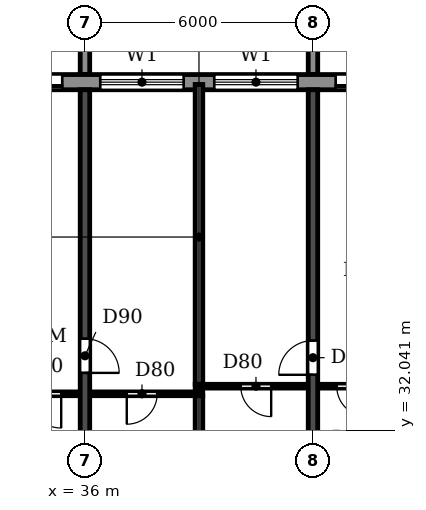
"""IFC4 building model, lengths in metres.
Left out: names, types, materials, properties, quantities, classifications, styles, units other than length and angle.
Written with IfcOpenShell. Run it as: python <this file> out.ifc"""

import sys

from ifc_helpers import new_model, si_unit, direction, frame, frame_2d, origin, place, context, subcontext, project, spatial, polyline, rectangle, outline, extrude, source, transform, mapped, element, fill, save


model = new_model("IFC4")
c1 = context("Model", 3, precision=1e-05, world=origin(), true_north=direction((0.0, 1.0)))
c2 = subcontext(c1, "Body", "Model", "MODEL_VIEW")
j1 = project(units=[si_unit("LENGTHUNIT", "METRE"), si_unit("PLANEANGLEUNIT", "RADIAN")], contexts=[c1])
p1 = place(None, origin())
s1 = spatial("IfcSite", under=j1, at=p1, CompositionType="ELEMENT")
p2 = place(p1, origin())
s2 = spatial("IfcBuilding", under=s1, at=p2, CompositionType="ELEMENT")
p3 = place(p2, frame((0.0, 0.0, 181.8)))
s3 = spatial("IfcBuildingStorey", under=s2, at=p3, CompositionType="ELEMENT", Elevation=181.8)
p4 = place(p3, frame((36.0, 30.5, 0.0), z_axis=(0.0, 0.0, 1.0), x_axis=(0.0, 1.0, 0.0)))
e1 = element("IfcWall", 1, at=p4, inside=s3, PredefinedType="SHEAR", context=c2, shape_type="SweptSolid", body=[
    extrude(rectangle(XDim=10.5, YDim=0.25, at=frame_2d((5.25, 0.0))), origin(), (0.0, 0.0, 1.0), 3.08),
])
p5 = place(p4, frame((3.05, 0.0, 0.0)))
e2 = element("IfcOpeningElement", 2, at=p5, cuts=e1, PredefinedType="OPENING", context=c2, shape_type="SweptSolid", body=[
    extrude(rectangle(XDim=0.9, YDim=2.1, at=frame_2d((0.45, 1.05))), frame((0.0, 0.135, 0.0), z_axis=(0.0, -1.0, 0.0), x_axis=(1.0, 0.0, 0.0)), (0.0, 0.0, 1.0), 0.27),
])
p6 = place(p3, frame((42.0, 30.5, 0.0), z_axis=(0.0, 0.0, 1.0), x_axis=(0.0, 1.0, 0.0)))
e3 = element("IfcWall", 3, at=p6, inside=s3, PredefinedType="SHEAR", context=c2, shape_type="SweptSolid", body=[
    extrude(rectangle(XDim=10.5, YDim=0.25, at=frame_2d((5.25, 0.0))), origin(), (0.0, 0.0, 1.0), 3.08),
])
p7 = place(p6, frame((3.0, 0.0, 0.0)))
e4 = element("IfcOpeningElement", 4, at=p7, cuts=e3, PredefinedType="OPENING", context=c2, shape_type="SweptSolid", body=[
    extrude(rectangle(XDim=0.9, YDim=2.1, at=frame_2d((0.45, 1.05))), frame((0.0, 0.135, 0.0), z_axis=(0.0, -1.0, 0.0), x_axis=(1.0, 0.0, 0.0)), (0.0, 0.0, 1.0), 0.27),
])
p8 = place(p3, frame((79.317, 41.2, 0.0), z_axis=(0.0, 0.0, 1.0), x_axis=(-1.0, 0.0, 0.0)))
e5 = element("IfcWall", 5, at=p8, inside=s3, PredefinedType="STANDARD", context=c2, shape_type="SweptSolid", body=[
    extrude(rectangle(XDim=56.634, YDim=0.4, at=frame_2d((28.317, 0.0))), origin(), (0.0, 0.0, 1.0), 3.08),
])
p9 = place(p8, frame((52.917, 0.0, 0.0)))
e6 = element("IfcOpeningElement", 6, at=p9, cuts=e5, PredefinedType="OPENING", context=c2, shape_type="SweptSolid", body=[
    extrude(rectangle(XDim=1.8, YDim=2.4, at=frame_2d((0.9, 1.2))), frame((0.0, 0.21, 0.0), z_axis=(0.0, -1.0, 0.0), x_axis=(1.0, 0.0, 0.0)), (0.0, 0.0, 1.0), 0.42),
])
p10 = place(p8, frame((49.717, 0.0, 0.9)))
e7 = element("IfcOpeningElement", 7, at=p10, cuts=e5, PredefinedType="OPENING", context=c2, shape_type="SweptSolid", body=[
    extrude(rectangle(XDim=2.2, YDim=1.5, at=frame_2d((1.1, 0.75))), frame((0.0, 0.21, 0.0), z_axis=(0.0, -1.0, 0.0), x_axis=(1.0, 0.0, 0.0)), (0.0, 0.0, 1.0), 0.42),
])
p11 = place(p8, frame((46.717, 0.0, 0.9)))
e8 = element("IfcOpeningElement", 8, at=p11, cuts=e5, PredefinedType="OPENING", context=c2, shape_type="SweptSolid", body=[
    extrude(rectangle(XDim=2.2, YDim=1.5, at=frame_2d((1.1, 0.75))), frame((0.0, 0.21, 0.0), z_axis=(0.0, -1.0, 0.0), x_axis=(1.0, 0.0, 0.0)), (0.0, 0.0, 1.0), 0.42),
])
p12 = place(p8, frame((43.917, 0.0, 0.0)))
e9 = element("IfcOpeningElement", 9, at=p12, cuts=e5, PredefinedType="OPENING", context=c2, shape_type="SweptSolid", body=[
    extrude(rectangle(XDim=1.8, YDim=2.4, at=frame_2d((0.9, 1.2))), frame((0.0, 0.21, 0.0), z_axis=(0.0, -1.0, 0.0), x_axis=(1.0, 0.0, 0.0)), (0.0, 0.0, 1.0), 0.42),
])
p13 = place(p8, frame((40.717, 0.0, 0.9)))
e10 = element("IfcOpeningElement", 10, at=p13, cuts=e5, PredefinedType="OPENING", context=c2, shape_type="SweptSolid", body=[
    extrude(rectangle(XDim=2.2, YDim=1.5, at=frame_2d((1.1, 0.75))), frame((0.0, 0.21, 0.0), z_axis=(0.0, -1.0, 0.0), x_axis=(1.0, 0.0, 0.0)), (0.0, 0.0, 1.0), 0.42),
])
p14 = place(p8, frame((37.717, 0.0, 0.9)))
e11 = element("IfcOpeningElement", 11, at=p14, cuts=e5, PredefinedType="OPENING", context=c2, shape_type="SweptSolid", body=[
    extrude(rectangle(XDim=2.2, YDim=1.5, at=frame_2d((1.1, 0.75))), frame((0.0, 0.21, 0.0), z_axis=(0.0, -1.0, 0.0), x_axis=(1.0, 0.0, 0.0)), (0.0, 0.0, 1.0), 0.42),
])
p15 = place(p8, frame((34.917, 0.0, 0.0)))
e12 = element("IfcOpeningElement", 12, at=p15, cuts=e5, PredefinedType="OPENING", context=c2, shape_type="SweptSolid", body=[
    extrude(rectangle(XDim=1.8, YDim=2.4, at=frame_2d((0.9, 1.2))), frame((0.0, 0.21, 0.0), z_axis=(0.0, -1.0, 0.0), x_axis=(1.0, 0.0, 0.0)), (0.0, 0.0, 1.0), 0.42),
])
p16 = place(p8, frame((31.717, 0.0, 0.9)))
e13 = element("IfcOpeningElement", 13, at=p16, cuts=e5, PredefinedType="OPENING", context=c2, shape_type="SweptSolid", body=[
    extrude(rectangle(XDim=2.2, YDim=1.5, at=frame_2d((1.1, 0.75))), frame((0.0, 0.21, 0.0), z_axis=(0.0, -1.0, 0.0), x_axis=(1.0, 0.0, 0.0)), (0.0, 0.0, 1.0), 0.42),
])
p17 = place(p8, frame((28.717, 0.0, 0.9)))
e14 = element("IfcOpeningElement", 14, at=p17, cuts=e5, PredefinedType="OPENING", context=c2, shape_type="SweptSolid", body=[
    extrude(rectangle(XDim=2.2, YDim=1.5, at=frame_2d((1.1, 0.75))), frame((0.0, 0.21, 0.0), z_axis=(0.0, -1.0, 0.0), x_axis=(1.0, 0.0, 0.0)), (0.0, 0.0, 1.0), 0.42),
])
p18 = place(p8, frame((25.717, 0.0, 0.9)))
e15 = element("IfcOpeningElement", 15, at=p18, cuts=e5, PredefinedType="OPENING", context=c2, shape_type="SweptSolid", body=[
    extrude(rectangle(XDim=2.2, YDim=1.5, at=frame_2d((1.1, 0.75))), frame((0.0, 0.21, 0.0), z_axis=(0.0, -1.0, 0.0), x_axis=(1.0, 0.0, 0.0)), (0.0, 0.0, 1.0), 0.42),
])
p19 = place(p8, frame((22.917, 0.0, 0.0)))
e16 = element("IfcOpeningElement", 16, at=p19, cuts=e5, PredefinedType="OPENING", context=c2, shape_type="SweptSolid", body=[
    extrude(rectangle(XDim=1.8, YDim=2.4, at=frame_2d((0.9, 1.2))), frame((0.0, 0.21, 0.0), z_axis=(0.0, -1.0, 0.0), x_axis=(1.0, 0.0, 0.0)), (0.0, 0.0, 1.0), 0.42),
])
p20 = place(p8, frame((19.717, 0.0, 0.9)))
e17 = element("IfcOpeningElement", 17, at=p20, cuts=e5, PredefinedType="OPENING", context=c2, shape_type="SweptSolid", body=[
    extrude(rectangle(XDim=2.2, YDim=1.5, at=frame_2d((1.1, 0.75))), frame((0.0, 0.21, 0.0), z_axis=(0.0, -1.0, 0.0), x_axis=(1.0, 0.0, 0.0)), (0.0, 0.0, 1.0), 0.42),
])
p21 = place(p8, frame((16.917, 0.0, 0.0)))
e18 = element("IfcOpeningElement", 18, at=p21, cuts=e5, PredefinedType="OPENING", context=c2, shape_type="SweptSolid", body=[
    extrude(rectangle(XDim=1.8, YDim=2.4, at=frame_2d((0.9, 1.2))), frame((0.0, 0.21, 0.0), z_axis=(0.0, -1.0, 0.0), x_axis=(1.0, 0.0, 0.0)), (0.0, 0.0, 1.0), 0.42),
])
p22 = place(p8, frame((13.717, 0.0, 0.9)))
e19 = element("IfcOpeningElement", 19, at=p22, cuts=e5, PredefinedType="OPENING", context=c2, shape_type="SweptSolid", body=[
    extrude(rectangle(XDim=2.2, YDim=1.5, at=frame_2d((1.1, 0.75))), frame((0.0, 0.21, 0.0), z_axis=(0.0, -1.0, 0.0), x_axis=(1.0, 0.0, 0.0)), (0.0, 0.0, 1.0), 0.42),
])
p23 = place(p8, frame((10.917, 0.0, 0.0)))
e20 = element("IfcOpeningElement", 20, at=p23, cuts=e5, PredefinedType="OPENING", context=c2, shape_type="SweptSolid", body=[
    extrude(rectangle(XDim=1.8, YDim=2.4, at=frame_2d((0.9, 1.2))), frame((0.0, 0.21, 0.0), z_axis=(0.0, -1.0, 0.0), x_axis=(1.0, 0.0, 0.0)), (0.0, 0.0, 1.0), 0.42),
])
p24 = place(p8, frame((7.717, 0.0, 0.9)))
e21 = element("IfcOpeningElement", 21, at=p24, cuts=e5, PredefinedType="OPENING", context=c2, shape_type="SweptSolid", body=[
    extrude(rectangle(XDim=2.2, YDim=1.5, at=frame_2d((1.1, 0.75))), frame((0.0, 0.21, 0.0), z_axis=(0.0, -1.0, 0.0), x_axis=(1.0, 0.0, 0.0)), (0.0, 0.0, 1.0), 0.42),
])
p25 = place(p8, frame((4.717, 0.0, 0.9)))
e22 = element("IfcOpeningElement", 22, at=p25, cuts=e5, PredefinedType="OPENING", context=c2, shape_type="SweptSolid", body=[
    extrude(rectangle(XDim=2.2, YDim=1.5, at=frame_2d((1.1, 0.75))), frame((0.0, 0.21, 0.0), z_axis=(0.0, -1.0, 0.0), x_axis=(1.0, 0.0, 0.0)), (0.0, 0.0, 1.0), 0.42),
])
p26 = place(p8, frame((1.917, 0.0, 0.0)))
e23 = element("IfcOpeningElement", 23, at=p26, cuts=e5, PredefinedType="OPENING", context=c2, shape_type="SweptSolid", body=[
    extrude(rectangle(XDim=1.8, YDim=2.4, at=frame_2d((0.9, 1.2))), frame((0.0, 0.21, 0.0), z_axis=(0.0, -1.0, 0.0), x_axis=(1.0, 0.0, 0.0)), (0.0, 0.0, 1.0), 0.42),
])
m1 = source(origin(), c2, "Body", "SweptSolid", [
    extrude(outline(polyline([(0.0, 0.0), (0.25, 0.0), (0.25, 3.1), (0.0, 3.1), (0.0, 0.0)])), origin(), (0.0, 0.0, 1.0), 3.1),
])
for number, where in (
    (24, (35.875, 41.4, 0.0)),
    (25, (41.875, 41.4, 0.0)),
):
    element("IfcWall", number, at=place(p3, frame(where)), inside=s3, PredefinedType="STANDARD", context=c2, shape_type="MappedRepresentation", body=[
        mapped(m1, transform((0.0, 0.0, 0.0))),
    ])
p27 = place(p3, frame((39.0, 30.51, 0.0), z_axis=(0.0, 0.0, 1.0), x_axis=(0.0, 1.0, 0.0)))
e26 = element("IfcWall", 26, at=p27, inside=s3, PredefinedType="PARTITIONING", context=c2, shape_type="SweptSolid", body=[
    extrude(rectangle(XDim=2.44, YDim=0.2, at=frame_2d((1.22, 0.0))), origin(), (0.0, 0.0, 1.0), 3.08),
])
p28 = place(p3, frame((39.0, 33.25, 0.0), z_axis=(0.0, 0.0, 1.0), x_axis=(0.0, 1.0, 0.0)))
e27 = element("IfcWall", 27, at=p28, inside=s3, PredefinedType="PARTITIONING", context=c2, shape_type="SweptSolid", body=[
    extrude(rectangle(XDim=7.89, YDim=0.2, at=frame_2d((3.945, 0.0))), origin(), (0.0, 0.0, 1.0), 3.08),
])
p29 = place(p3, frame((33.8, 33.0, 0.0), z_axis=(0.0, 0.0, 1.0), x_axis=(1.0, 0.0, 0.0)))
e28 = element("IfcWall", 28, at=p29, inside=s3, PredefinedType="PARTITIONING", context=c2, shape_type="SweptSolid", body=[
    extrude(rectangle(XDim=2.065, YDim=0.1, at=frame_2d((1.032, 0.0))), origin(), (0.0, 0.0, 1.0), 3.08),
])
p30 = place(p29, frame((0.675, 0.0, 0.0)))
e29 = element("IfcOpeningElement", 29, at=p30, cuts=e28, PredefinedType="OPENING", context=c2, shape_type="SweptSolid", body=[
    extrude(rectangle(XDim=0.9, YDim=2.1, at=frame_2d((0.45, 1.05))), frame((0.0, 0.06, 0.0), z_axis=(0.0, -1.0, 0.0), x_axis=(1.0, 0.0, 0.0)), (0.0, 0.0, 1.0), 0.12),
])
p31 = place(p3, frame((36.135, 33.0, 0.0), z_axis=(0.0, 0.0, 1.0), x_axis=(1.0, 0.0, 0.0)))
e30 = element("IfcWall", 30, at=p31, inside=s3, PredefinedType="PARTITIONING", context=c2, shape_type="SweptSolid", body=[
    extrude(rectangle(XDim=2.965, YDim=0.1, at=frame_2d((1.482, 0.0))), origin(), (0.0, 0.0, 1.0), 3.08),
])
p32 = place(p31, frame((0.965, 0.0, 0.0)))
e31 = element("IfcOpeningElement", 31, at=p32, cuts=e30, PredefinedType="OPENING", context=c2, shape_type="SweptSolid", body=[
    extrude(rectangle(XDim=0.8, YDim=2.1, at=frame_2d((0.4, 1.05))), frame((0.0, 0.06, 0.0), z_axis=(0.0, -1.0, 0.0), x_axis=(1.0, 0.0, 0.0)), (0.0, 0.0, 1.0), 0.12),
])
p33 = place(p3, frame((38.9, 33.2, 0.0), z_axis=(0.0, 0.0, 1.0), x_axis=(1.0, 0.0, 0.0)))
e32 = element("IfcWall", 32, at=p33, inside=s3, PredefinedType="PARTITIONING", context=c2, shape_type="SweptSolid", body=[
    extrude(rectangle(XDim=2.965, YDim=0.1, at=frame_2d((1.482, 0.0))), origin(), (0.0, 0.0, 1.0), 3.08),
])
p34 = place(p33, frame((1.2, 0.0, 0.0)))
e33 = element("IfcOpeningElement", 33, at=p34, cuts=e32, PredefinedType="OPENING", context=c2, shape_type="SweptSolid", body=[
    extrude(rectangle(XDim=0.8, YDim=2.1, at=frame_2d((0.4, 1.05))), frame((0.0, 0.06, 0.0), z_axis=(0.0, -1.0, 0.0), x_axis=(1.0, 0.0, 0.0)), (0.0, 0.0, 1.0), 0.12),
])
p35 = place(p3, frame((42.135, 33.2, 0.0), z_axis=(0.0, 0.0, 1.0), x_axis=(1.0, 0.0, 0.0)))
e34 = element("IfcWall", 34, at=p35, inside=s3, PredefinedType="PARTITIONING", context=c2, shape_type="SweptSolid", body=[
    extrude(rectangle(XDim=1.965, YDim=0.1, at=frame_2d((0.982, 0.0))), origin(), (0.0, 0.0, 1.0), 3.08),
])
p36 = place(p35, frame((0.49, 0.0, 0.0)))
e35 = element("IfcOpeningElement", 35, at=p36, cuts=e34, PredefinedType="OPENING", context=c2, shape_type="SweptSolid", body=[
    extrude(rectangle(XDim=0.8, YDim=2.1, at=frame_2d((0.4, 1.05))), frame((0.0, 0.06, 0.0), z_axis=(0.0, -1.0, 0.0), x_axis=(1.0, 0.0, 0.0)), (0.0, 0.0, 1.0), 0.12),
])
p37 = place(p12, origin())
e36 = element("IfcDoor", 36, at=p37, inside=s3, OperationType="DOUBLE_DOOR_SLIDING", PredefinedType="DOOR", context=c2, shape_type="SweptSolid", body=[
    extrude(rectangle(XDim=1.8, YDim=2.4, at=frame_2d((0.9, 1.2))), frame((0.0, 0.025, 0.0), z_axis=(0.0, -1.0, 0.0), x_axis=(1.0, 0.0, 0.0)), (0.0, 0.0, 1.0), 0.05),
])
fill(e9, e36)
p38 = place(p13, origin())
e37 = element("IfcWindow", 37, at=p38, inside=s3, PartitioningType="DOUBLE_PANEL_HORIZONTAL", PredefinedType="WINDOW", context=c2, shape_type="SweptSolid", body=[
    extrude(rectangle(XDim=2.2, YDim=1.5, at=frame_2d((1.1, 0.75))), frame((0.0, 0.03, 0.0), z_axis=(0.0, -1.0, 0.0), x_axis=(1.0, 0.0, 0.0)), (0.0, 0.0, 1.0), 0.06),
])
fill(e10, e37)
p39 = place(p14, origin())
e38 = element("IfcWindow", 38, at=p39, inside=s3, PartitioningType="DOUBLE_PANEL_HORIZONTAL", PredefinedType="WINDOW", context=c2, shape_type="SweptSolid", body=[
    extrude(rectangle(XDim=2.2, YDim=1.5, at=frame_2d((1.1, 0.75))), frame((0.0, 0.03, 0.0), z_axis=(0.0, -1.0, 0.0), x_axis=(1.0, 0.0, 0.0)), (0.0, 0.0, 1.0), 0.06),
])
fill(e11, e38)
p40 = place(p15, origin())
e39 = element("IfcDoor", 39, at=p40, inside=s3, OperationType="DOUBLE_DOOR_SLIDING", PredefinedType="DOOR", context=c2, shape_type="SweptSolid", body=[
    extrude(rectangle(XDim=1.8, YDim=2.4, at=frame_2d((0.9, 1.2))), frame((0.0, 0.025, 0.0), z_axis=(0.0, -1.0, 0.0), x_axis=(1.0, 0.0, 0.0)), (0.0, 0.0, 1.0), 0.05),
])
fill(e12, e39)
p41 = place(p32, frame((0.8, 0.0, 0.0), z_axis=(0.0, 0.0, 1.0), x_axis=(-1.0, 0.0, 0.0)))
e40 = element("IfcDoor", 40, at=p41, inside=s3, OperationType="SINGLE_SWING_RIGHT", PredefinedType="DOOR", context=c2, shape_type="SweptSolid", body=[
    extrude(rectangle(XDim=0.8, YDim=2.1, at=frame_2d((0.4, 1.05))), frame((0.0, 0.025, 0.0), z_axis=(0.0, -1.0, 0.0), x_axis=(1.0, 0.0, 0.0)), (0.0, 0.0, 1.0), 0.05),
])
fill(e31, e40)
p42 = place(p30, frame((0.9, 0.0, 0.0), z_axis=(0.0, 0.0, 1.0), x_axis=(-1.0, 0.0, 0.0)))
e41 = element("IfcDoor", 41, at=p42, inside=s3, OperationType="SINGLE_SWING_LEFT", PredefinedType="DOOR", context=c2, shape_type="SweptSolid", body=[
    extrude(rectangle(XDim=0.9, YDim=2.1, at=frame_2d((0.45, 1.05))), frame((0.0, 0.025, 0.0), z_axis=(0.0, -1.0, 0.0), x_axis=(1.0, 0.0, 0.0)), (0.0, 0.0, 1.0), 0.05),
])
fill(e29, e41)
p43 = place(p5, frame((0.9, 0.0, 0.0), z_axis=(0.0, 0.0, 1.0), x_axis=(-1.0, 0.0, 0.0)))
e42 = element("IfcDoor", 42, at=p43, inside=s3, OperationType="SINGLE_SWING_RIGHT", PredefinedType="DOOR", context=c2, shape_type="SweptSolid", body=[
    extrude(rectangle(XDim=0.9, YDim=2.1, at=frame_2d((0.45, 1.05))), frame((0.0, 0.025, 0.0), z_axis=(0.0, -1.0, 0.0), x_axis=(1.0, 0.0, 0.0)), (0.0, 0.0, 1.0), 0.05),
])
fill(e2, e42)
p44 = place(p34, frame((0.8, 0.0, 0.0), z_axis=(0.0, 0.0, 1.0), x_axis=(-1.0, 0.0, 0.0)))
e43 = element("IfcDoor", 43, at=p44, inside=s3, OperationType="SINGLE_SWING_LEFT", PredefinedType="DOOR", context=c2, shape_type="SweptSolid", body=[
    extrude(rectangle(XDim=0.8, YDim=2.1, at=frame_2d((0.4, 1.05))), frame((0.0, 0.025, 0.0), z_axis=(0.0, -1.0, 0.0), x_axis=(1.0, 0.0, 0.0)), (0.0, 0.0, 1.0), 0.05),
])
fill(e33, e43)
p45 = place(p7, origin())
e44 = element("IfcDoor", 44, at=p45, inside=s3, OperationType="SINGLE_SWING_LEFT", PredefinedType="DOOR", context=c2, shape_type="SweptSolid", body=[
    extrude(rectangle(XDim=0.9, YDim=2.1, at=frame_2d((0.45, 1.05))), frame((0.0, 0.025, 0.0), z_axis=(0.0, -1.0, 0.0), x_axis=(1.0, 0.0, 0.0)), (0.0, 0.0, 1.0), 0.05),
])
fill(e4, e44)
p46 = place(p36, frame((0.8, 0.0, 0.0), z_axis=(0.0, 0.0, 1.0), x_axis=(-1.0, 0.0, 0.0)))
e45 = element("IfcDoor", 45, at=p46, inside=s3, OperationType="SINGLE_SWING_LEFT", PredefinedType="DOOR", context=c2, shape_type="SweptSolid", body=[
    extrude(rectangle(XDim=0.8, YDim=2.1, at=frame_2d((0.4, 1.05))), frame((0.0, 0.025, 0.0), z_axis=(0.0, -1.0, 0.0), x_axis=(1.0, 0.0, 0.0)), (0.0, 0.0, 1.0), 0.05),
])
fill(e35, e45)
save(model, sys.argv[1])
